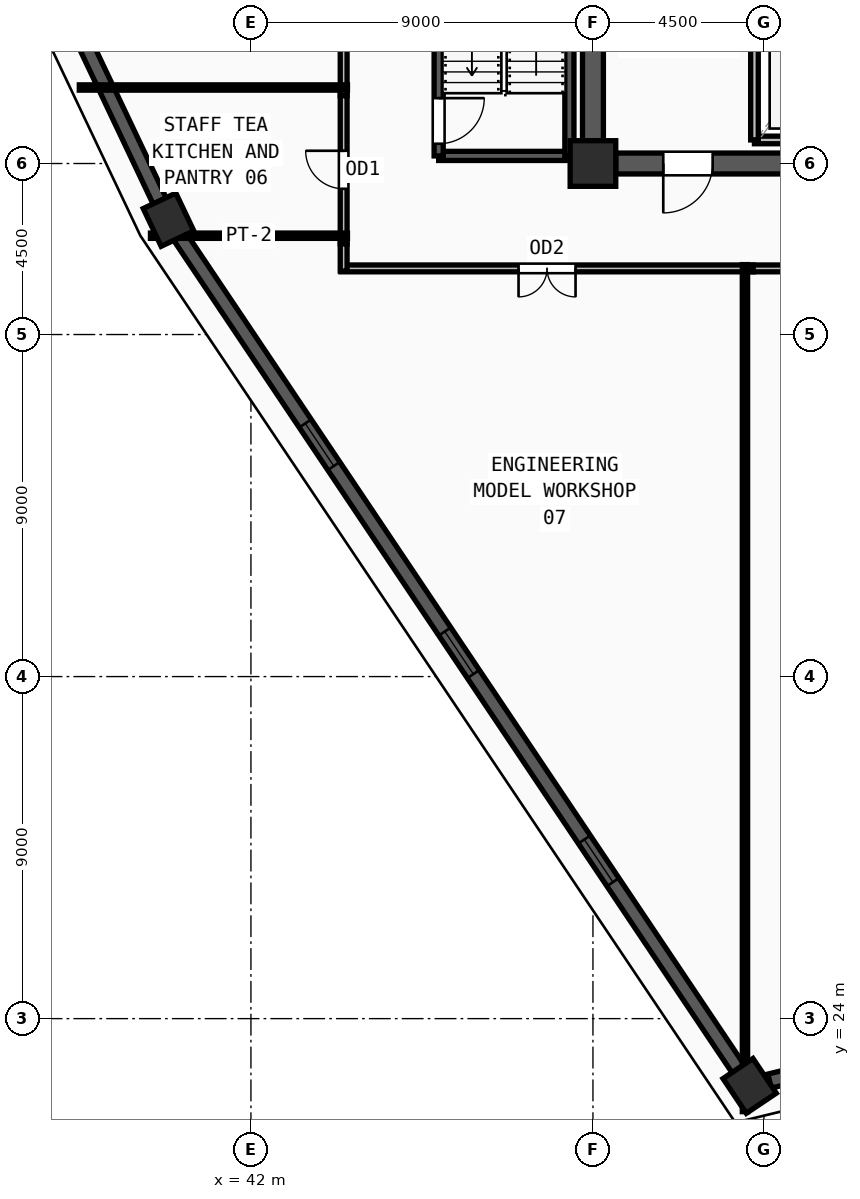
"""IFC4 building model, lengths in metres.
Left out: names, types, materials, properties, quantities, classifications, styles, units other than length and angle.
Written with IfcOpenShell. Run it as: python <this file> out.ifc"""

import sys

from ifc_helpers import new_model, si_unit, direction, frame, frame_2d, origin, origin_2d, place, context, subcontext, project, spatial, rectangle, extrude, source, transform, mapped, element, fill, save


model = new_model("IFC4")
c1 = context("Model", 3, precision=1e-05, world=origin(), true_north=direction((0.0, 1.0)))
c2 = subcontext(c1, "Body", "Model", "MODEL_VIEW")
j1 = project(units=[si_unit("LENGTHUNIT", "METRE"), si_unit("PLANEANGLEUNIT", "RADIAN")], contexts=[c1])
p1 = place(None, origin())
s1 = spatial("IfcSite", under=j1, at=p1, CompositionType="ELEMENT")
p2 = place(p1, origin())
s2 = spatial("IfcBuilding", under=s1, at=p2, CompositionType="ELEMENT")
p3 = place(p2, frame((0.0, 0.0, 309.0)))
s3 = spatial("IfcBuildingStorey", under=s2, at=p3, CompositionType="ELEMENT", Elevation=309.0)
m1 = source(origin(), c2, "Body", "SweptSolid", [
    extrude(rectangle(XDim=1.2, YDim=1.2, at=origin_2d()), origin(), (0.0, 0.0, 1.0), 3.75),
])
p4 = place(p3, frame((51.0, 46.5, 0.0), z_axis=(0.0, 0.0, 1.0), x_axis=(1.0, 0.0, 0.0)))
e1 = element("IfcColumn", 1, at=p4, inside=s3, PredefinedType="COLUMN", context=c2, shape_type="MappedRepresentation", body=[
    mapped(m1, transform((0.0, 0.0, 0.0), x_axis=(1.0, 0.0, 0.0), y_axis=(0.0, 1.0, 0.0), z_axis=(0.0, 0.0, 1.0), scale=1.0)),
])
m2 = source(origin(), c2, "Body", "SweptSolid", [
    extrude(rectangle(XDim=1.1, YDim=0.95, at=origin_2d()), origin(), (0.0, 0.0, 1.0), 3.75),
])
for number, where, z_axis, x_axis in (
    (2, (55.123, 22.23, 0.0), (0.0, 0.0, 1.0), (-0.557, 0.83, 0.0)),
    (3, (39.831, 45.022, 0.0), (0.0, 0.0, 1.0), (-0.429, 0.903, 0.0)),
):
    element("IfcColumn", number, at=place(p3, frame(where, z_axis=z_axis, x_axis=x_axis)), inside=s3, PredefinedType="COLUMN", context=c2, shape_type="MappedRepresentation", body=[
        mapped(m2, transform((0.0, 0.0, 0.0), x_axis=(1.0, 0.0, 0.0), y_axis=(0.0, 1.0, 0.0), z_axis=(0.0, 0.0, 1.0), scale=1.0)),
    ])
p5 = place(p3, frame((30.273, 65.167, 0.0), z_axis=(0.0, 0.0, 1.0), x_axis=(0.428684844901, -0.903454096096, 0.0)))
e4 = element("IfcWall", 4, at=p5, inside=s3, PredefinedType="SOLIDWALL", context=c2, shape_type="SweptSolid", body=[
    extrude(rectangle(XDim=21.758, YDim=0.38, at=frame_2d((10.879, 0.0))), origin(), (0.0, 0.0, 1.0), 3.57),
])
m3 = source(origin(), c2, "Body", "SweptSolid", [
    extrude(rectangle(XDim=1.35, YDim=1.85, at=frame_2d((0.675, 0.925))), frame((0.0, 0.2, 0.0), z_axis=(0.0, -1.0, 0.0), x_axis=(1.0, 0.0, 0.0)), (0.0, 0.0, 1.0), 0.4),
])
p6 = place(p5, frame((4.764, 0.0, 0.55)))
e5 = element("IfcOpeningElement", 5, at=p6, cuts=e4, PredefinedType="OPENING", context=c2, shape_type="MappedRepresentation", body=[
    mapped(m3, transform((0.0, 0.0, 0.0), x_axis=(1.0, 0.0, 0.0), y_axis=(0.0, 1.0, 0.0), z_axis=(0.0, 0.0, 1.0), scale=1.0)),
])
p7 = place(p5, frame((10.204, 0.0, 0.55)))
e6 = element("IfcOpeningElement", 6, at=p7, cuts=e4, PredefinedType="OPENING", context=c2, shape_type="MappedRepresentation", body=[
    mapped(m3, transform((0.0, 0.0, 0.0), x_axis=(1.0, 0.0, 0.0), y_axis=(0.0, 1.0, 0.0), z_axis=(0.0, 0.0, 1.0), scale=1.0)),
])
p8 = place(p5, frame((15.643, 0.0, 0.55)))
e7 = element("IfcOpeningElement", 7, at=p8, cuts=e4, PredefinedType="OPENING", context=c2, shape_type="MappedRepresentation", body=[
    mapped(m3, transform((0.0, 0.0, 0.0), x_axis=(1.0, 0.0, 0.0), y_axis=(0.0, 1.0, 0.0), z_axis=(0.0, 0.0, 1.0), scale=1.0)),
])
p9 = place(p3, frame((40.132, 44.574, 0.0), z_axis=(0.0, 0.0, 1.0), x_axis=(0.557129450607, -0.830425659085, 0.0)))
e8 = element("IfcWall", 8, at=p9, inside=s3, PredefinedType="SOLIDWALL", context=c2, shape_type="SweptSolid", body=[
    extrude(rectangle(XDim=26.367, YDim=0.38, at=frame_2d((13.184, 0.0))), origin(), (0.0, 0.0, 1.0), 3.57),
])
p10 = place(p9, frame((5.917, 0.0, 0.55)))
e9 = element("IfcOpeningElement", 9, at=p10, cuts=e8, PredefinedType="OPENING", context=c2, shape_type="MappedRepresentation", body=[
    mapped(m3, transform((0.0, 0.0, 0.0), x_axis=(1.0, 0.0, 0.0), y_axis=(0.0, 1.0, 0.0), z_axis=(0.0, 0.0, 1.0), scale=1.0)),
])
p11 = place(p9, frame((12.509, 0.0, 0.55)))
e10 = element("IfcOpeningElement", 10, at=p11, cuts=e8, PredefinedType="OPENING", context=c2, shape_type="MappedRepresentation", body=[
    mapped(m3, transform((0.0, 0.0, 0.0), x_axis=(1.0, 0.0, 0.0), y_axis=(0.0, 1.0, 0.0), z_axis=(0.0, 0.0, 1.0), scale=1.0)),
])
p12 = place(p9, frame((19.1, 0.0, 0.55)))
e11 = element("IfcOpeningElement", 11, at=p12, cuts=e8, PredefinedType="OPENING", context=c2, shape_type="MappedRepresentation", body=[
    mapped(m3, transform((0.0, 0.0, 0.0), x_axis=(1.0, 0.0, 0.0), y_axis=(0.0, 1.0, 0.0), z_axis=(0.0, 0.0, 1.0), scale=1.0)),
])
p13 = place(p3, frame((55.648, 22.357, 0.0), z_axis=(0.0, 0.0, 1.0), x_axis=(0.9720661116, 0.234707210539, 0.0)))
e12 = element("IfcWall", 12, at=p13, inside=s3, PredefinedType="SOLIDWALL", context=c2, shape_type="SweptSolid", body=[
    extrude(rectangle(XDim=3.937, YDim=0.38, at=frame_2d((1.969, 0.0))), origin(), (0.0, 0.0, 1.0), 3.57),
])
m4 = source(origin(), c2, "Body", "SweptSolid", [
    extrude(rectangle(XDim=1.2, YDim=1.9, at=frame_2d((0.6, 0.95))), frame((0.0, 0.2, 0.0), z_axis=(0.0, -1.0, 0.0), x_axis=(1.0, 0.0, 0.0)), (0.0, 0.0, 1.0), 0.4),
])
p14 = place(p13, frame((1.368, 0.0, 0.55)))
e13 = element("IfcOpeningElement", 13, at=p14, cuts=e12, PredefinedType="OPENING", context=c2, shape_type="MappedRepresentation", body=[
    mapped(m4, transform((0.0, 0.0, 0.0), x_axis=(1.0, 0.0, 0.0), y_axis=(0.0, 1.0, 0.0), z_axis=(0.0, 0.0, 1.0), scale=1.0)),
])
p15 = place(p3, frame((59.4, 46.5, 0.0), z_axis=(0.0, 0.0, 1.0), x_axis=(-1.0, 0.0, 0.0)))
e14 = element("IfcWall", 14, at=p15, inside=s3, PredefinedType="SHEAR", context=c2, shape_type="SweptSolid", body=[
    extrude(rectangle(XDim=7.8, YDim=0.55, at=frame_2d((3.9, 0.0))), origin(), (0.0, 0.0, 1.0), 3.57),
])
m5 = source(origin(), c2, "Body", "SweptSolid", [
    extrude(rectangle(XDim=1.3, YDim=2.2, at=frame_2d((0.65, 1.1))), frame((0.0, 0.285, 0.0), z_axis=(0.0, -1.0, 0.0), x_axis=(1.0, 0.0, 0.0)), (0.0, 0.0, 1.0), 0.57),
])
p16 = place(p15, frame((5.25, 0.0, 0.0)))
e15 = element("IfcOpeningElement", 15, at=p16, cuts=e14, PredefinedType="OPENING", context=c2, shape_type="MappedRepresentation", body=[
    mapped(m5, transform((0.0, 0.0, 0.0), x_axis=(1.0, 0.0, 0.0), y_axis=(0.0, 1.0, 0.0), z_axis=(0.0, 0.0, 1.0), scale=1.0)),
])
m6 = source(origin(), c2, "Body", "SweptSolid", [
    extrude(rectangle(XDim=1.0, YDim=2.2, at=frame_2d((0.5, 1.1))), frame((0.0, 0.285, 0.0), z_axis=(0.0, -1.0, 0.0), x_axis=(1.0, 0.0, 0.0)), (0.0, 0.0, 1.0), 0.57),
])
p17 = place(p15, frame((0.75, 0.0, 0.0)))
e16 = element("IfcOpeningElement", 16, at=p17, cuts=e14, PredefinedType="OPENING", context=c2, shape_type="MappedRepresentation", body=[
    mapped(m6, transform((0.0, 0.0, 0.0), x_axis=(1.0, 0.0, 0.0), y_axis=(0.0, 1.0, 0.0), z_axis=(0.0, 0.0, 1.0), scale=1.0)),
])
p18 = place(p3, frame((51.0, 47.1, 0.0), z_axis=(0.0, 0.0, 1.0), x_axis=(0.0, 1.0, 0.0)))
e17 = element("IfcWall", 17, at=p18, inside=s3, PredefinedType="SHEAR", context=c2, shape_type="SweptSolid", body=[
    extrude(rectangle(XDim=13.8, YDim=0.55, at=frame_2d((6.9, 0.0))), origin(), (0.0, 0.0, 1.0), 3.57),
])
p19 = place(p3, frame((46.94, 46.7, 0.0), z_axis=(0.0, 0.0, 1.0), x_axis=(1.0, 0.0, 0.0)))
e18 = element("IfcWall", 18, at=p19, inside=s3, PredefinedType="SOLIDWALL", context=c2, shape_type="SweptSolid", body=[
    extrude(rectangle(XDim=3.44, YDim=0.24, at=frame_2d((1.72, 0.0))), origin(), (0.0, 0.0, 1.0), 3.57),
])
p20 = place(p3, frame((50.38, 46.7, 0.0), z_axis=(0.0, 0.0, 1.0), x_axis=(0.0, 1.0, 0.0)))
e19 = element("IfcWall", 19, at=p20, inside=s3, PredefinedType="SOLIDWALL", context=c2, shape_type="SweptSolid", body=[
    extrude(rectangle(XDim=7.82, YDim=0.24, at=frame_2d((3.91, 0.0))), origin(), (0.0, 0.0, 1.0), 3.57),
])
p21 = place(p3, frame((46.94, 54.52, 0.0), z_axis=(0.0, 0.0, 1.0), x_axis=(0.0, -1.0, 0.0)))
e20 = element("IfcWall", 20, at=p21, inside=s3, PredefinedType="SOLIDWALL", context=c2, shape_type="SweptSolid", body=[
    extrude(rectangle(XDim=7.82, YDim=0.24, at=frame_2d((3.91, 0.0))), origin(), (0.0, 0.0, 1.0), 3.57),
])
m7 = source(origin(), c2, "Body", "SweptSolid", [
    extrude(rectangle(XDim=1.2, YDim=2.2, at=frame_2d((0.6, 1.1))), frame((0.0, 0.13, 0.0), z_axis=(0.0, -1.0, 0.0), x_axis=(1.0, 0.0, 0.0)), (0.0, 0.0, 1.0), 0.26),
])
p22 = place(p21, frame((6.3, 0.0, 0.0)))
e21 = element("IfcOpeningElement", 21, at=p22, cuts=e20, PredefinedType="OPENING", context=c2, shape_type="MappedRepresentation", body=[
    mapped(m7, transform((0.0, 0.0, 0.0), x_axis=(1.0, 0.0, 0.0), y_axis=(0.0, 1.0, 0.0), z_axis=(0.0, 0.0, 1.0), scale=1.0)),
])
p23 = place(p3, frame((55.25, 47.12, 0.0), z_axis=(0.0, 0.0, 1.0), x_axis=(1.0, 0.0, 0.0)))
e22 = element("IfcWall", 22, at=p23, inside=s3, PredefinedType="SOLIDWALL", context=c2, shape_type="SweptSolid", body=[
    extrude(rectangle(XDim=2.4, YDim=0.2, at=frame_2d((1.2, 0.0))), origin(), (0.0, 0.0, 1.0), 3.57),
])
p24 = place(p3, frame((55.25, 50.12, 0.0), z_axis=(0.0, 0.0, 1.0), x_axis=(0.0, -1.0, 0.0)))
e23 = element("IfcWall", 23, at=p24, inside=s3, PredefinedType="SOLIDWALL", context=c2, shape_type="SweptSolid", body=[
    extrude(rectangle(XDim=3.0, YDim=0.2, at=frame_2d((1.5, 0.0))), origin(), (0.0, 0.0, 1.0), 3.57),
])
p25 = place(p3, frame((44.44, 48.285, 0.0), z_axis=(0.0, 0.0, 1.0), x_axis=(0.0, 1.0, 0.0)))
e24 = element("IfcWall", 24, at=p25, inside=s3, PredefinedType="PARTITIONING", context=c2, shape_type="SweptSolid", body=[
    extrude(rectangle(XDim=8.055, YDim=0.18, at=frame_2d((4.028, 0.0))), origin(), (0.0, 0.0, 1.0), 3.261),
])
m8 = source(origin(), c2, "Body", "SweptSolid", [
    extrude(rectangle(XDim=1.5, YDim=2.2, at=frame_2d((0.75, 1.1))), frame((0.0, 0.1, 0.0), z_axis=(0.0, -1.0, 0.0), x_axis=(1.0, 0.0, 0.0)), (0.0, 0.0, 1.0), 0.2),
])
p26 = place(p25, frame((3.278, 0.0, 0.0)))
e25 = element("IfcOpeningElement", 25, at=p26, cuts=e24, PredefinedType="OPENING", context=c2, shape_type="MappedRepresentation", body=[
    mapped(m8, transform((0.0, 0.0, 0.0), x_axis=(1.0, 0.0, 0.0), y_axis=(0.0, 1.0, 0.0), z_axis=(0.0, 0.0, 1.0), scale=1.0)),
])
p27 = place(p3, frame((44.44, 44.385, 0.0), z_axis=(0.0, 0.0, 1.0), x_axis=(0.0, 1.0, 0.0)))
e26 = element("IfcWall", 26, at=p27, inside=s3, PredefinedType="PARTITIONING", context=c2, shape_type="SweptSolid", body=[
    extrude(rectangle(XDim=3.9, YDim=0.18, at=frame_2d((1.95, 0.0))), origin(), (0.0, 0.0, 1.0), 3.57),
])
m9 = source(origin(), c2, "Body", "SweptSolid", [
    extrude(rectangle(XDim=1.0, YDim=2.2, at=frame_2d((0.5, 1.1))), frame((0.0, 0.1, 0.0), z_axis=(0.0, -1.0, 0.0), x_axis=(1.0, 0.0, 0.0)), (0.0, 0.0, 1.0), 0.2),
])
p28 = place(p27, frame((1.45, 0.0, 0.0)))
e27 = element("IfcOpeningElement", 27, at=p28, cuts=e26, PredefinedType="OPENING", context=c2, shape_type="MappedRepresentation", body=[
    mapped(m9, transform((0.0, 0.0, 0.0), x_axis=(1.0, 0.0, 0.0), y_axis=(0.0, 1.0, 0.0), z_axis=(0.0, 0.0, 1.0), scale=1.0)),
])
p29 = place(p3, frame((55.215, 43.74, 0.0), z_axis=(0.0, 0.0, 1.0), x_axis=(-1.0, 0.0, 0.0)))
e28 = element("IfcWall", 28, at=p29, inside=s3, PredefinedType="PARTITIONING", context=c2, shape_type="SweptSolid", body=[
    extrude(rectangle(XDim=10.845, YDim=0.18, at=frame_2d((5.422, 0.0))), origin(), (0.0, 0.0, 1.0), 3.57),
])
p30 = place(p29, frame((4.673, 0.0, 0.0)))
e29 = element("IfcOpeningElement", 29, at=p30, cuts=e28, PredefinedType="OPENING", context=c2, shape_type="MappedRepresentation", body=[
    mapped(m8, transform((0.0, 0.0, 0.0), x_axis=(1.0, 0.0, 0.0), y_axis=(0.0, 1.0, 0.0), z_axis=(0.0, 0.0, 1.0), scale=1.0)),
])
p31 = place(p3, frame((75.63, 43.74, 0.0), z_axis=(0.0, 0.0, 1.0), x_axis=(-1.0, 0.0, 0.0)))
e30 = element("IfcWall", 30, at=p31, inside=s3, PredefinedType="PARTITIONING", context=c2, shape_type="SweptSolid", body=[
    extrude(rectangle(XDim=20.415, YDim=0.18, at=frame_2d((10.208, 0.0))), origin(), (0.0, 0.0, 1.0), 3.57),
])
p32 = place(p31, frame((9.457, 0.0, 0.0)))
e31 = element("IfcOpeningElement", 31, at=p32, cuts=e30, PredefinedType="OPENING", context=c2, shape_type="MappedRepresentation", body=[
    mapped(m8, transform((0.0, 0.0, 0.0), x_axis=(1.0, 0.0, 0.0), y_axis=(0.0, 1.0, 0.0), z_axis=(0.0, 0.0, 1.0), scale=1.0)),
])
p33 = place(p3, frame((44.44, 43.67, 0.0), z_axis=(0.0, 0.0, 1.0), x_axis=(0.0, 1.0, 0.0)))
e32 = element("IfcWall", 32, at=p33, inside=s3, PredefinedType="PARTITIONING", context=c2, shape_type="SweptSolid", body=[
    extrude(rectangle(XDim=0.715, YDim=0.18, at=frame_2d((0.357, 0.0))), origin(), (0.0, 0.0, 1.0), 3.57),
])
p34 = place(p3, frame((44.54, 44.6, 0.0), z_axis=(0.0, 0.0, 1.0), x_axis=(-1.0, 0.0, 0.0)))
e33 = element("IfcWall", 33, at=p34, inside=s3, PredefinedType="PARTITIONING", context=c2, shape_type="SweptSolid", body=[
    extrude(rectangle(XDim=5.184, YDim=0.14, at=frame_2d((2.592, 0.0))), origin(), (0.0, 0.0, 1.0), 3.57),
])
p35 = place(p3, frame((44.54, 48.5, 0.0), z_axis=(0.0, 0.0, 1.0), x_axis=(-1.0, 0.0, 0.0)))
e34 = element("IfcWall", 34, at=p35, inside=s3, PredefinedType="PARTITIONING", context=c2, shape_type="SweptSolid", body=[
    extrude(rectangle(XDim=7.056, YDim=0.14, at=frame_2d((3.528, 0.0))), origin(), (0.0, 0.0, 1.0), 3.57),
])
p36 = place(p3, frame((55.0, 43.84, 0.0), z_axis=(0.0, 0.0, 1.0), x_axis=(0.0, -1.0, 0.0)))
e35 = element("IfcWall", 35, at=p36, inside=s3, PredefinedType="PARTITIONING", context=c2, shape_type="SweptSolid", body=[
    extrude(rectangle(XDim=22.288, YDim=0.14, at=frame_2d((11.144, 0.0))), origin(), (0.0, 0.0, 1.0), 2.967),
])
m10 = source(origin(), c2, "Body", "SweptSolid", [
    extrude(rectangle(XDim=1.35, YDim=1.85, at=frame_2d((0.675, 0.925))), frame((0.0, 0.03, 0.0), z_axis=(0.0, -1.0, 0.0), x_axis=(1.0, 0.0, 0.0)), (0.0, 0.0, 1.0), 0.06),
])
p37 = place(p10, origin())
e36 = element("IfcWindow", 36, at=p37, inside=s3, PartitioningType="SINGLE_PANEL", PredefinedType="WINDOW", context=c2, shape_type="MappedRepresentation", body=[
    mapped(m10, transform((0.0, 0.0, 0.0), x_axis=(1.0, 0.0, 0.0), y_axis=(0.0, 1.0, 0.0), z_axis=(0.0, 0.0, 1.0), scale=1.0)),
])
fill(e9, e36)
p38 = place(p11, origin())
e37 = element("IfcWindow", 37, at=p38, inside=s3, PartitioningType="SINGLE_PANEL", PredefinedType="WINDOW", context=c2, shape_type="MappedRepresentation", body=[
    mapped(m10, transform((0.0, 0.0, 0.0), x_axis=(1.0, 0.0, 0.0), y_axis=(0.0, 1.0, 0.0), z_axis=(0.0, 0.0, 1.0), scale=1.0)),
])
fill(e10, e37)
p39 = place(p12, origin())
e38 = element("IfcWindow", 38, at=p39, inside=s3, PartitioningType="SINGLE_PANEL", PredefinedType="WINDOW", context=c2, shape_type="MappedRepresentation", body=[
    mapped(m10, transform((0.0, 0.0, 0.0), x_axis=(1.0, 0.0, 0.0), y_axis=(0.0, 1.0, 0.0), z_axis=(0.0, 0.0, 1.0), scale=1.0)),
])
fill(e11, e38)
m11 = source(origin(), c2, "Body", "SweptSolid", [
    extrude(rectangle(XDim=1.3, YDim=2.2, at=frame_2d((0.65, 1.1))), frame((0.0, 0.025, 0.0), z_axis=(0.0, -1.0, 0.0), x_axis=(1.0, 0.0, 0.0)), (0.0, 0.0, 1.0), 0.05),
])
p40 = place(p16, origin())
e39 = element("IfcDoor", 39, at=p40, inside=s3, OperationType="SINGLE_SWING_RIGHT", PredefinedType="DOOR", context=c2, shape_type="MappedRepresentation", body=[
    mapped(m11, transform((0.0, 0.0, 0.0), x_axis=(1.0, 0.0, 0.0), y_axis=(0.0, 1.0, 0.0), z_axis=(0.0, 0.0, 1.0), scale=1.0)),
])
fill(e15, e39)
m12 = source(origin(), c2, "Body", "SweptSolid", [
    extrude(rectangle(XDim=1.2, YDim=2.2, at=frame_2d((0.6, 1.1))), frame((0.0, 0.025, 0.0), z_axis=(0.0, -1.0, 0.0), x_axis=(1.0, 0.0, 0.0)), (0.0, 0.0, 1.0), 0.05),
])
p41 = place(p22, origin())
e40 = element("IfcDoor", 40, at=p41, inside=s3, OperationType="SINGLE_SWING_LEFT", PredefinedType="DOOR", context=c2, shape_type="MappedRepresentation", body=[
    mapped(m12, transform((0.0, 0.0, 0.0), x_axis=(1.0, 0.0, 0.0), y_axis=(0.0, 1.0, 0.0), z_axis=(0.0, 0.0, 1.0), scale=1.0)),
])
fill(e21, e40)
m13 = source(origin(), c2, "Body", "SweptSolid", [
    extrude(rectangle(XDim=1.0, YDim=2.2, at=frame_2d((0.5, 1.1))), frame((0.0, 0.025, 0.0), z_axis=(0.0, -1.0, 0.0), x_axis=(1.0, 0.0, 0.0)), (0.0, 0.0, 1.0), 0.05),
])
p42 = place(p28, origin())
e41 = element("IfcDoor", 41, at=p42, inside=s3, OperationType="SINGLE_SWING_RIGHT", PredefinedType="DOOR", context=c2, shape_type="MappedRepresentation", body=[
    mapped(m13, transform((0.0, 0.0, 0.0), x_axis=(1.0, 0.0, 0.0), y_axis=(0.0, 1.0, 0.0), z_axis=(0.0, 0.0, 1.0), scale=1.0)),
])
fill(e27, e41)
m14 = source(origin(), c2, "Body", "SweptSolid", [
    extrude(rectangle(XDim=1.5, YDim=2.2, at=frame_2d((0.75, 1.1))), frame((0.0, 0.025, 0.0), z_axis=(0.0, -1.0, 0.0), x_axis=(1.0, 0.0, 0.0)), (0.0, 0.0, 1.0), 0.05),
])
p43 = place(p30, origin())
e42 = element("IfcDoor", 42, at=p43, inside=s3, OperationType="DOUBLE_DOOR_SINGLE_SWING", PredefinedType="DOOR", context=c2, shape_type="MappedRepresentation", body=[
    mapped(m14, transform((0.0, 0.0, 0.0), x_axis=(1.0, 0.0, 0.0), y_axis=(0.0, 1.0, 0.0), z_axis=(0.0, 0.0, 1.0), scale=1.0)),
])
fill(e29, e42)
save(model, sys.argv[1])
